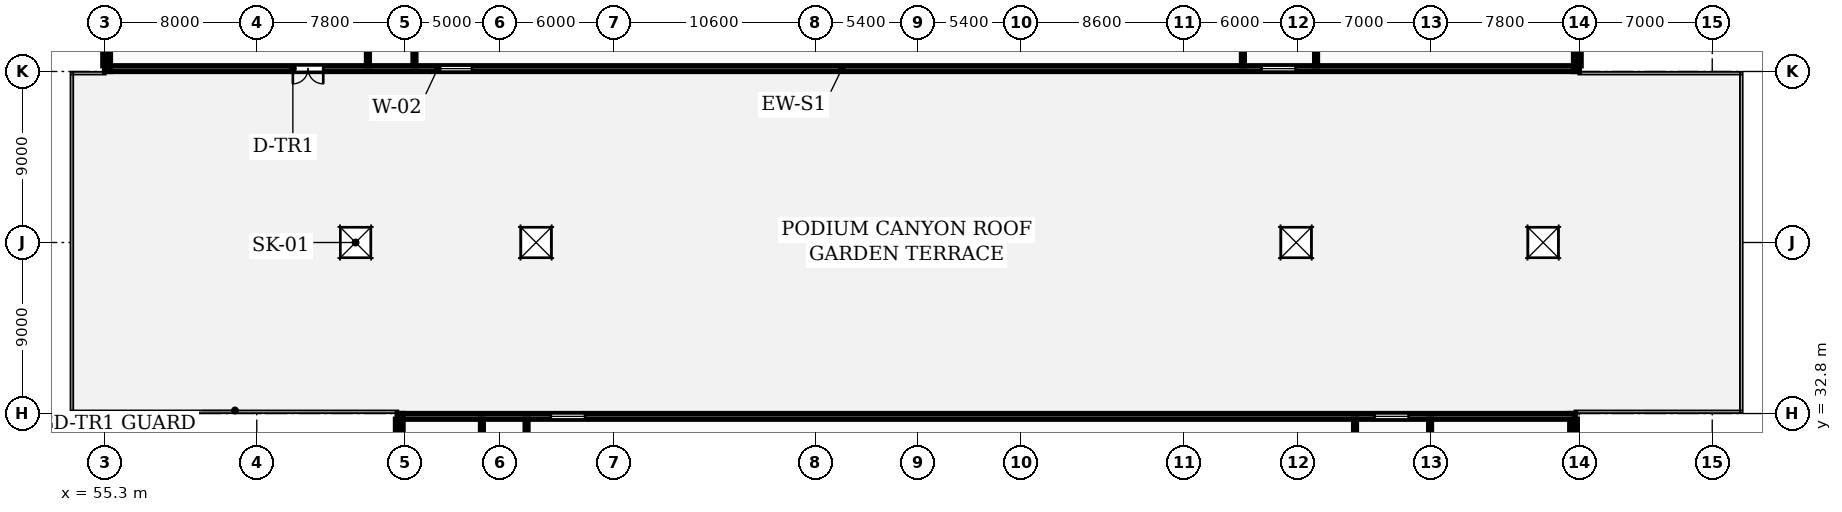
"""IFC4 building model, lengths in metres.
Left out: names, types, materials, properties, quantities, classifications, styles, units other than length and angle.
Written with IfcOpenShell. Run it as: python <this file> out.ifc"""

import sys

from ifc_helpers import new_model, si_unit, direction, frame, frame_2d, origin, origin_2d, place, context, subcontext, project, spatial, rectangle, extrude, element, fill, save


model = new_model("IFC4")
c1 = context("Model", 3, precision=1e-05, world=origin(), true_north=direction((0.0, 1.0)))
c2 = subcontext(c1, "Body", "Model", "MODEL_VIEW")
j1 = project(units=[si_unit("LENGTHUNIT", "METRE"), si_unit("PLANEANGLEUNIT", "RADIAN")], contexts=[c1])
p1 = place(None, origin())
s1 = spatial("IfcSite", under=j1, at=p1, CompositionType="ELEMENT")
p2 = place(p1, origin())
s2 = spatial("IfcBuilding", under=s1, at=p2, CompositionType="ELEMENT")
p3 = place(p2, frame((0.0, 0.0, 24.0)))
s3 = spatial("IfcBuildingStorey", under=s2, at=p3, CompositionType="ELEMENT", Elevation=24.0)
p4 = place(p3, frame((55.3, 50.95, 0.0), z_axis=(0.0, 0.0, 1.0), x_axis=(1.0, 0.0, 0.0)))
e1 = element("IfcWall", 1, at=p4, inside=s3, PredefinedType="STANDARD", context=c2, shape_type="SweptSolid", body=[
    extrude(rectangle(XDim=77.6, YDim=0.3, at=frame_2d((38.8, 0.0))), origin(), (0.0, 0.0, 1.0), 2.97),
])
p5 = place(p4, frame((17.525, 0.0, 0.85)))
e2 = element("IfcOpeningElement", 2, at=p5, cuts=e1, PredefinedType="OPENING", context=c2, shape_type="SweptSolid", body=[
    extrude(rectangle(XDim=1.8, YDim=1.8, at=frame_2d((0.9, 0.9))), frame((0.0, 0.16, 0.0), z_axis=(0.0, -1.0, 0.0), x_axis=(1.0, 0.0, 0.0)), (0.0, 0.0, 1.0), 0.32),
])
p6 = place(p4, frame((60.875, 0.0, 0.85)))
e3 = element("IfcOpeningElement", 3, at=p6, cuts=e1, PredefinedType="OPENING", context=c2, shape_type="SweptSolid", body=[
    extrude(rectangle(XDim=1.8, YDim=1.8, at=frame_2d((0.9, 0.9))), frame((0.0, 0.16, 0.0), z_axis=(0.0, -1.0, 0.0), x_axis=(1.0, 0.0, 0.0)), (0.0, 0.0, 1.0), 0.32),
])
p7 = place(p4, frame((9.9, 0.0, 0.0)))
e4 = element("IfcOpeningElement", 4, at=p7, cuts=e1, PredefinedType="OPENING", context=c2, shape_type="SweptSolid", body=[
    extrude(rectangle(XDim=1.6, YDim=2.2, at=frame_2d((0.8, 1.1))), frame((0.0, 0.16, 0.0), z_axis=(0.0, -1.0, 0.0), x_axis=(1.0, 0.0, 0.0)), (0.0, 0.0, 1.0), 0.32),
])
for number, where, z_axis, x_axis in (
    (5, (132.75, 50.8, 0.0), (0.0, 0.0, 1.0), (0.0, 1.0, 0.0)),
    (6, (55.45, 54.4, 0.0), (0.0, 0.0, 1.0), (0.0, -1.0, 0.0)),
):
    element("IfcWall", number, at=place(p3, frame(where, z_axis=z_axis, x_axis=x_axis)), inside=s3, PredefinedType="STANDARD", context=c2, shape_type="SweptSolid", body=[
        extrude(rectangle(XDim=3.6, YDim=0.3, at=frame_2d((1.8, 0.0))), origin(), (0.0, 0.0, 1.0), 2.97),
    ])
p8 = place(p3, frame((132.55, 29.2, 0.0), z_axis=(0.0, 0.0, 1.0), x_axis=(0.0, 1.0, 0.0)))
e7 = element("IfcWall", 7, at=p8, inside=s3, PredefinedType="STANDARD", context=c2, shape_type="SweptSolid", body=[
    extrude(rectangle(XDim=3.6, YDim=0.3, at=frame_2d((1.8, 0.0))), origin(), (0.0, 0.0, 1.0), 2.97),
])
p9 = place(p3, frame((132.7, 32.65, 0.0), z_axis=(0.0, 0.0, 1.0), x_axis=(-1.0, 0.0, 0.0)))
e8 = element("IfcWall", 8, at=p9, inside=s3, PredefinedType="STANDARD", context=c2, shape_type="SweptSolid", body=[
    extrude(rectangle(XDim=62.0, YDim=0.3, at=frame_2d((31.0, 0.0))), origin(), (0.0, 0.0, 1.0), 2.97),
])
p10 = place(p9, frame((52.125, 0.0, 0.85)))
e9 = element("IfcOpeningElement", 9, at=p10, cuts=e8, PredefinedType="OPENING", context=c2, shape_type="SweptSolid", body=[
    extrude(rectangle(XDim=1.8, YDim=1.8, at=frame_2d((0.9, 0.9))), frame((0.0, 0.16, 0.0), z_axis=(0.0, -1.0, 0.0), x_axis=(1.0, 0.0, 0.0)), (0.0, 0.0, 1.0), 0.32),
])
p11 = place(p9, frame((8.775, 0.0, 0.85)))
e10 = element("IfcOpeningElement", 10, at=p11, cuts=e8, PredefinedType="OPENING", context=c2, shape_type="SweptSolid", body=[
    extrude(rectangle(XDim=1.8, YDim=1.8, at=frame_2d((0.9, 0.9))), frame((0.0, 0.16, 0.0), z_axis=(0.0, -1.0, 0.0), x_axis=(1.0, 0.0, 0.0)), (0.0, 0.0, 1.0), 0.32),
])
p12 = place(p3, frame((70.85, 32.8, 0.0), z_axis=(0.0, 0.0, 1.0), x_axis=(0.0, -1.0, 0.0)))
e11 = element("IfcWall", 11, at=p12, inside=s3, PredefinedType="STANDARD", context=c2, shape_type="SweptSolid", body=[
    extrude(rectangle(XDim=3.6, YDim=0.3, at=frame_2d((1.8, 0.0))), origin(), (0.0, 0.0, 1.0), 2.97),
])
p13 = place(p3, frame((55.3, 51.1, 0.0), z_axis=(0.0, 0.0, 1.0), x_axis=(0.0, 1.0, 0.0)))
e12 = element("IfcWall", 12, at=p13, inside=s3, PredefinedType="PARTITIONING", context=c2, shape_type="SweptSolid", body=[
    extrude(rectangle(XDim=16.1, YDim=0.2, at=frame_2d((8.05, 0.0))), origin(), (0.0, 0.0, 1.0), 2.97),
])
p14 = place(p3, frame((69.15, 51.1, 0.0), z_axis=(0.0, 0.0, 1.0), x_axis=(0.0, 1.0, 0.0)))
e13 = element("IfcWall", 13, at=p14, inside=s3, PredefinedType="PARTITIONING", context=c2, shape_type="SweptSolid", body=[
    extrude(rectangle(XDim=16.05, YDim=0.15, at=frame_2d((8.025, 0.0))), origin(), (0.0, 0.0, 1.0), 2.97),
])
p15 = place(p14, frame((11.3, 0.0, 0.0)))
e14 = element("IfcOpeningElement", 14, at=p15, cuts=e13, PredefinedType="OPENING", context=c2, shape_type="SweptSolid", body=[
    extrude(rectangle(XDim=0.88, YDim=2.06, at=frame_2d((0.44, 1.03))), frame((0.0, 0.085, 0.0), z_axis=(0.0, -1.0, 0.0), x_axis=(1.0, 0.0, 0.0)), (0.0, 0.0, 1.0), 0.17),
])
p16 = place(p3, frame((71.6, 51.1, 0.0), z_axis=(0.0, 0.0, 1.0), x_axis=(0.0, 1.0, 0.0)))
e15 = element("IfcWall", 15, at=p16, inside=s3, PredefinedType="PARTITIONING", context=c2, shape_type="SweptSolid", body=[
    extrude(rectangle(XDim=4.97, YDim=0.15, at=frame_2d((2.485, 0.0))), origin(), (0.0, 0.0, 1.0), 2.97),
])
p17 = place(p3, frame((132.9, 51.1, 0.0), z_axis=(0.0, 0.0, 1.0), x_axis=(0.0, 1.0, 0.0)))
e16 = element("IfcWall", 16, at=p17, inside=s3, PredefinedType="PARTITIONING", context=c2, shape_type="SweptSolid", body=[
    extrude(rectangle(XDim=16.1, YDim=0.2, at=frame_2d((8.05, 0.0))), origin(), (0.0, 0.0, 1.0), 2.97),
])
p18 = place(p3, frame((119.05, 51.1, 0.0), z_axis=(0.0, 0.0, 1.0), x_axis=(0.0, 1.0, 0.0)))
e17 = element("IfcWall", 17, at=p18, inside=s3, PredefinedType="PARTITIONING", context=c2, shape_type="SweptSolid", body=[
    extrude(rectangle(XDim=16.05, YDim=0.15, at=frame_2d((8.025, 0.0))), origin(), (0.0, 0.0, 1.0), 2.97),
])
p19 = place(p18, frame((11.3, 0.0, 0.0)))
e18 = element("IfcOpeningElement", 18, at=p19, cuts=e17, PredefinedType="OPENING", context=c2, shape_type="SweptSolid", body=[
    extrude(rectangle(XDim=0.88, YDim=2.06, at=frame_2d((0.44, 1.03))), frame((0.0, 0.085, 0.0), z_axis=(0.0, -1.0, 0.0), x_axis=(1.0, 0.0, 0.0)), (0.0, 0.0, 1.0), 0.17),
])
p20 = place(p3, frame((115.2, 51.1, 0.0), z_axis=(0.0, 0.0, 1.0), x_axis=(0.0, 1.0, 0.0)))
e19 = element("IfcWall", 19, at=p20, inside=s3, PredefinedType="PARTITIONING", context=c2, shape_type="SweptSolid", body=[
    extrude(rectangle(XDim=4.55, YDim=0.15, at=frame_2d((2.275, 0.0))), origin(), (0.0, 0.0, 1.0), 2.97),
])
p21 = place(p3, frame((70.7, 18.4, 0.0), z_axis=(0.0, 0.0, 1.0), x_axis=(0.0, 1.0, 0.0)))
e20 = element("IfcWall", 20, at=p21, inside=s3, PredefinedType="PARTITIONING", context=c2, shape_type="SweptSolid", body=[
    extrude(rectangle(XDim=14.1, YDim=0.2, at=frame_2d((7.05, 0.0))), origin(), (0.0, 0.0, 1.0), 2.97),
])
p22 = place(p3, frame((75.15, 18.45, 0.0), z_axis=(0.0, 0.0, 1.0), x_axis=(0.0, 1.0, 0.0)))
e21 = element("IfcWall", 21, at=p22, inside=s3, PredefinedType="PARTITIONING", context=c2, shape_type="SweptSolid", body=[
    extrude(rectangle(XDim=14.05, YDim=0.15, at=frame_2d((7.025, 0.0))), origin(), (0.0, 0.0, 1.0), 2.97),
])
p23 = place(p22, frame((3.32, 0.0, 0.0)))
e22 = element("IfcOpeningElement", 22, at=p23, cuts=e21, PredefinedType="OPENING", context=c2, shape_type="SweptSolid", body=[
    extrude(rectangle(XDim=0.88, YDim=2.06, at=frame_2d((0.44, 1.03))), frame((0.0, 0.085, 0.0), z_axis=(0.0, -1.0, 0.0), x_axis=(1.0, 0.0, 0.0)), (0.0, 0.0, 1.0), 0.17),
])
p24 = place(p3, frame((77.5, 27.57, 0.0), z_axis=(0.0, 0.0, 1.0), x_axis=(0.0, 1.0, 0.0)))
e23 = element("IfcWall", 23, at=p24, inside=s3, PredefinedType="PARTITIONING", context=c2, shape_type="SweptSolid", body=[
    extrude(rectangle(XDim=4.93, YDim=0.15, at=frame_2d((2.465, 0.0))), origin(), (0.0, 0.0, 1.0), 2.97),
])
p25 = place(p3, frame((132.7, 18.4, 0.0), z_axis=(0.0, 0.0, 1.0), x_axis=(0.0, 1.0, 0.0)))
e24 = element("IfcWall", 24, at=p25, inside=s3, PredefinedType="PARTITIONING", context=c2, shape_type="SweptSolid", body=[
    extrude(rectangle(XDim=14.1, YDim=0.2, at=frame_2d((7.05, 0.0))), origin(), (0.0, 0.0, 1.0), 2.97),
])
p26 = place(p3, frame((125.05, 18.45, 0.0), z_axis=(0.0, 0.0, 1.0), x_axis=(0.0, 1.0, 0.0)))
e25 = element("IfcWall", 25, at=p26, inside=s3, PredefinedType="PARTITIONING", context=c2, shape_type="SweptSolid", body=[
    extrude(rectangle(XDim=14.05, YDim=0.15, at=frame_2d((7.025, 0.0))), origin(), (0.0, 0.0, 1.0), 2.97),
])
p27 = place(p26, frame((3.32, 0.0, 0.0)))
e26 = element("IfcOpeningElement", 26, at=p27, cuts=e25, PredefinedType="OPENING", context=c2, shape_type="SweptSolid", body=[
    extrude(rectangle(XDim=0.88, YDim=2.06, at=frame_2d((0.44, 1.03))), frame((0.0, 0.085, 0.0), z_axis=(0.0, -1.0, 0.0), x_axis=(1.0, 0.0, 0.0)), (0.0, 0.0, 1.0), 0.17),
])
p28 = place(p3, frame((121.1, 28.05, 0.0), z_axis=(0.0, 0.0, 1.0), x_axis=(0.0, 1.0, 0.0)))
e27 = element("IfcWall", 27, at=p28, inside=s3, PredefinedType="PARTITIONING", context=c2, shape_type="SweptSolid", body=[
    extrude(rectangle(XDim=4.45, YDim=0.15, at=frame_2d((2.225, 0.0))), origin(), (0.0, 0.0, 1.0), 2.97),
])
p29 = place(p3, frame((0.0, 0.0, -0.27)))
p30 = place(p29, frame((68.5, 41.8, 0.0)))
p31 = place(p30, frame((0.0, 0.0, 0.22)))
e28 = element("IfcWindow", 28, at=p31, inside=s3, PartitioningType="SINGLE_PANEL", PredefinedType="SKYLIGHT", context=c2, shape_type="SweptSolid", body=[
    extrude(rectangle(XDim=1.6, YDim=1.6, at=origin_2d()), origin(), (0.0, 0.0, 1.0), 0.05),
])
p32 = place(p29, frame((78.0, 41.8, 0.0)))
p33 = place(p32, frame((0.0, 0.0, 0.22)))
e29 = element("IfcWindow", 29, at=p33, inside=s3, PartitioningType="SINGLE_PANEL", PredefinedType="SKYLIGHT", context=c2, shape_type="SweptSolid", body=[
    extrude(rectangle(XDim=1.6, YDim=1.6, at=origin_2d()), origin(), (0.0, 0.0, 1.0), 0.05),
])
p34 = place(p29, frame((118.0, 41.8, 0.0)))
p35 = place(p34, frame((0.0, 0.0, 0.22)))
e30 = element("IfcWindow", 30, at=p35, inside=s3, PartitioningType="SINGLE_PANEL", PredefinedType="SKYLIGHT", context=c2, shape_type="SweptSolid", body=[
    extrude(rectangle(XDim=1.6, YDim=1.6, at=origin_2d()), origin(), (0.0, 0.0, 1.0), 0.05),
])
p36 = place(p29, frame((131.0, 41.8, 0.0)))
p37 = place(p36, frame((0.0, 0.0, 0.22)))
e31 = element("IfcWindow", 31, at=p37, inside=s3, PartitioningType="SINGLE_PANEL", PredefinedType="SKYLIGHT", context=c2, shape_type="SweptSolid", body=[
    extrude(rectangle(XDim=1.6, YDim=1.6, at=origin_2d()), origin(), (0.0, 0.0, 1.0), 0.05),
])
p38 = place(p5, origin())
e32 = element("IfcWindow", 32, at=p38, inside=s3, PartitioningType="SINGLE_PANEL", PredefinedType="WINDOW", context=c2, shape_type="SweptSolid", body=[
    extrude(rectangle(XDim=1.8, YDim=1.8, at=frame_2d((0.9, 0.9))), frame((0.0, 0.03, 0.0), z_axis=(0.0, -1.0, 0.0), x_axis=(1.0, 0.0, 0.0)), (0.0, 0.0, 1.0), 0.06),
])
fill(e2, e32)
p39 = place(p6, origin())
e33 = element("IfcWindow", 33, at=p39, inside=s3, PartitioningType="SINGLE_PANEL", PredefinedType="WINDOW", context=c2, shape_type="SweptSolid", body=[
    extrude(rectangle(XDim=1.8, YDim=1.8, at=frame_2d((0.9, 0.9))), frame((0.0, 0.03, 0.0), z_axis=(0.0, -1.0, 0.0), x_axis=(1.0, 0.0, 0.0)), (0.0, 0.0, 1.0), 0.06),
])
fill(e3, e33)
p40 = place(p7, frame((1.6, 0.0, 0.0), z_axis=(0.0, 0.0, 1.0), x_axis=(-1.0, 0.0, 0.0)))
e34 = element("IfcDoor", 34, at=p40, inside=s3, OperationType="DOUBLE_DOOR_SINGLE_SWING", PredefinedType="DOOR", context=c2, shape_type="SweptSolid", body=[
    extrude(rectangle(XDim=1.6, YDim=2.2, at=frame_2d((0.8, 1.1))), frame((0.0, 0.025, 0.0), z_axis=(0.0, -1.0, 0.0), x_axis=(1.0, 0.0, 0.0)), (0.0, 0.0, 1.0), 0.05),
])
fill(e4, e34)
p41 = place(p10, origin())
e35 = element("IfcWindow", 35, at=p41, inside=s3, PartitioningType="SINGLE_PANEL", PredefinedType="WINDOW", context=c2, shape_type="SweptSolid", body=[
    extrude(rectangle(XDim=1.8, YDim=1.8, at=frame_2d((0.9, 0.9))), frame((0.0, 0.03, 0.0), z_axis=(0.0, -1.0, 0.0), x_axis=(1.0, 0.0, 0.0)), (0.0, 0.0, 1.0), 0.06),
])
fill(e9, e35)
p42 = place(p11, origin())
e36 = element("IfcWindow", 36, at=p42, inside=s3, PartitioningType="SINGLE_PANEL", PredefinedType="WINDOW", context=c2, shape_type="SweptSolid", body=[
    extrude(rectangle(XDim=1.8, YDim=1.8, at=frame_2d((0.9, 0.9))), frame((0.0, 0.03, 0.0), z_axis=(0.0, -1.0, 0.0), x_axis=(1.0, 0.0, 0.0)), (0.0, 0.0, 1.0), 0.06),
])
fill(e10, e36)
save(model, sys.argv[1])
